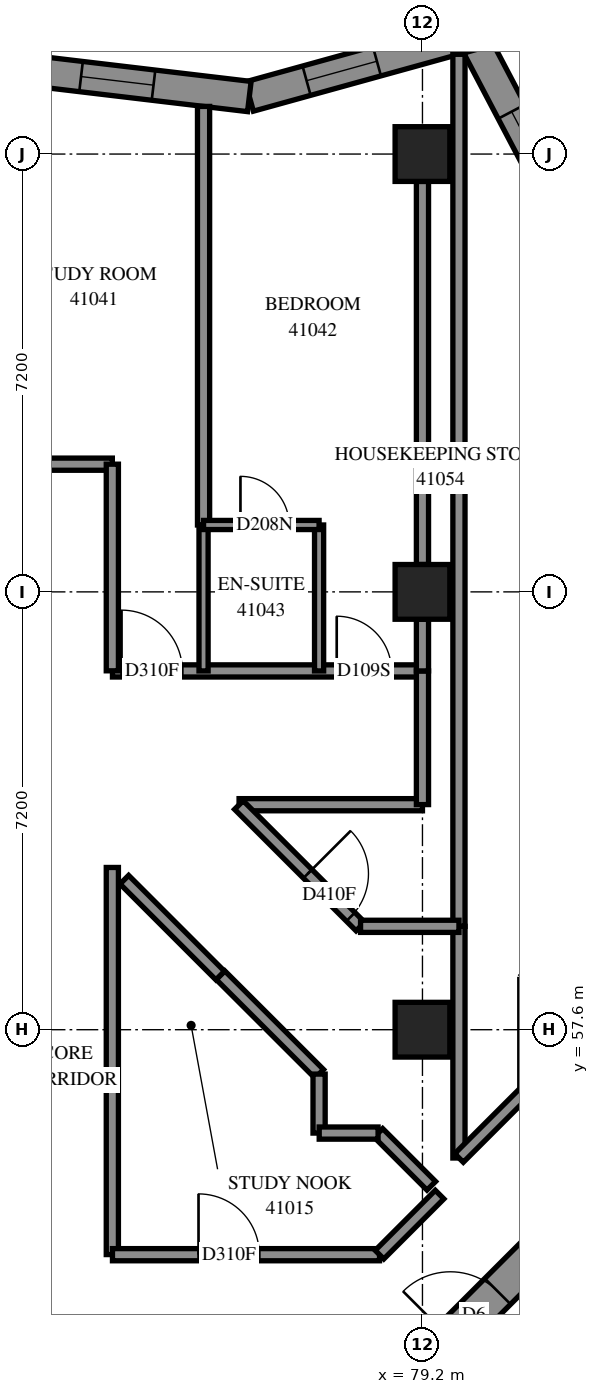
"""IFC4 building model, lengths in metres.
Left out: names, types, materials, properties, quantities, classifications, styles, units other than length and angle.
Written with IfcOpenShell. Run it as: python <this file> out.ifc"""

import sys

from ifc_helpers import new_model, si_unit, direction, frame, frame_2d, origin, origin_2d, place, context, subcontext, project, spatial, polyline, rectangle, outline, extrude, element, fill, save


model = new_model("IFC4")
c1 = context("Model", 3, precision=1e-05, world=origin(), true_north=direction((0.0, 1.0)))
c2 = subcontext(c1, "Body", "Model", "MODEL_VIEW")
j1 = project(units=[si_unit("LENGTHUNIT", "METRE"), si_unit("PLANEANGLEUNIT", "RADIAN")], contexts=[c1])
p1 = place(None, origin())
s1 = spatial("IfcSite", under=j1, at=p1, CompositionType="ELEMENT")
p2 = place(p1, origin())
s2 = spatial("IfcBuilding", under=s1, at=p2, CompositionType="ELEMENT")
p3 = place(p2, frame((0.0, 0.0, 152.4)))
s3 = spatial("IfcBuildingStorey", under=s2, at=p3, CompositionType="ELEMENT", Elevation=152.4)
for number, where, z_axis, x_axis in (
    (1, (79.2, 57.6, 0.0), (0.0, 0.0, 1.0), (1.0, 0.0, 0.0)),
    (2, (79.2, 64.8, 0.0), (0.0, 0.0, 1.0), (1.0, 0.0, 0.0)),
    (3, (79.2, 72.0, 0.0), (0.0, 0.0, 1.0), (1.0, 0.0, 0.0)),
):
    element("IfcColumn", number, at=place(p3, frame(where, z_axis=z_axis, x_axis=x_axis)), inside=s3, PredefinedType="COLUMN", context=c2, shape_type="SweptSolid", body=[
        extrude(rectangle(XDim=0.9, YDim=0.9, at=origin_2d()), origin(), (0.0, 0.0, 1.0), 3.1),
    ])
p4 = place(p3, frame((76.442, 49.302, -0.3), z_axis=(0.0, 0.0, 1.0), x_axis=(0.7071067812, 0.7071067812, 0.0)))
e4 = element("IfcWall", 4, at=p4, inside=s3, PredefinedType="SHEAR", context=c2, shape_type="SweptSolid", body=[
    extrude(rectangle(XDim=14.4, YDim=0.6, at=frame_2d((7.2, 0.0))), origin(), (0.0, 0.0, 1.0), 2.7),
])
p5 = place(p4, frame((4.55, 0.0, 0.3)))
e5 = element("IfcOpeningElement", 5, at=p5, cuts=e4, PredefinedType="OPENING", context=c2, shape_type="SweptSolid", body=[
    extrude(rectangle(XDim=1.1, YDim=2.1, at=frame_2d((0.55, 1.05))), frame((0.0, 0.31, 0.0), z_axis=(0.0, -1.0, 0.0), x_axis=(1.0, 0.0, 0.0)), (0.0, 0.0, 1.0), 0.62),
])
p6 = place(p4, frame((11.35, 0.0, 0.3)))
e6 = element("IfcOpeningElement", 6, at=p6, cuts=e4, PredefinedType="OPENING", context=c2, shape_type="SweptSolid", body=[
    extrude(rectangle(XDim=1.1, YDim=2.1, at=frame_2d((0.55, 1.05))), frame((0.0, 0.31, 0.0), z_axis=(0.0, -1.0, 0.0), x_axis=(1.0, 0.0, 0.0)), (0.0, 0.0, 1.0), 0.62),
])
p7 = place(p3, frame((81.582, 70.954, 0.0), z_axis=(0.0, 0.0, 1.0), x_axis=(-0.465076616, 0.8852704339, 0.0)))
e7 = element("IfcWall", 7, at=p7, inside=s3, PredefinedType="SOLIDWALL", context=c2, shape_type="SweptSolid", body=[
    extrude(outline(polyline([(0.055, -0.25), (3.593, -0.25), (3.189, 0.25), (-0.055, 0.25), (0.055, -0.25)])), origin(), (0.0, 0.0, 1.0), 3.1),
])
p8 = place(p7, frame((0.769, 0.0, 0.45)))
e8 = element("IfcOpeningElement", 8, at=p8, cuts=e7, PredefinedType="OPENING", context=c2, shape_type="SweptSolid", body=[
    extrude(rectangle(XDim=1.2, YDim=2.5, at=frame_2d((0.6, 1.25))), frame((0.0, 0.26, 0.0), z_axis=(0.0, -1.0, 0.0), x_axis=(1.0, 0.0, 0.0)), (0.0, 0.0, 1.0), 0.52),
])
p9 = place(p3, frame((80.005, 73.956, 0.0), z_axis=(0.0, 0.0, 1.0), x_axis=(-0.9638013092, -0.2666215226, 0.0)))
e9 = element("IfcWall", 9, at=p9, inside=s3, PredefinedType="SOLIDWALL", context=c2, shape_type="SweptSolid", body=[
    extrude(outline(polyline([(-0.202, -0.25), (3.74, -0.25), (3.838, 0.25), (0.202, 0.25), (-0.202, -0.25)])), origin(), (0.0, 0.0, 1.0), 3.1),
])
p10 = place(p9, frame((1.612, 0.0, 0.45)))
e10 = element("IfcOpeningElement", 10, at=p10, cuts=e9, PredefinedType="OPENING", context=c2, shape_type="SweptSolid", body=[
    extrude(rectangle(XDim=1.2, YDim=2.5, at=frame_2d((0.6, 1.25))), frame((0.0, 0.26, 0.0), z_axis=(0.0, -1.0, 0.0), x_axis=(1.0, 0.0, 0.0)), (0.0, 0.0, 1.0), 0.52),
])
p11 = place(p3, frame((76.353, 72.946, 0.0), z_axis=(0.0, 0.0, 1.0), x_axis=(-0.9930297168, 0.1178642505, 0.0)))
e11 = element("IfcWall", 11, at=p11, inside=s3, PredefinedType="SOLIDWALL", context=c2, shape_type="SweptSolid", body=[
    extrude(outline(polyline([(0.049, -0.25), (3.875, -0.25), (3.815, 0.25), (-0.049, 0.25), (0.049, -0.25)])), origin(), (0.0, 0.0, 1.0), 3.1),
])
p12 = place(p11, frame((1.587, 0.0, 0.45)))
e12 = element("IfcOpeningElement", 12, at=p12, cuts=e11, PredefinedType="OPENING", context=c2, shape_type="SweptSolid", body=[
    extrude(rectangle(XDim=1.2, YDim=2.5, at=frame_2d((0.6, 1.25))), frame((0.0, 0.26, 0.0), z_axis=(0.0, -1.0, 0.0), x_axis=(1.0, 0.0, 0.0)), (0.0, 0.0, 1.0), 0.52),
])
p13 = place(p3, frame((55.5, 66.9, 0.0), z_axis=(0.0, 0.0, 1.0), x_axis=(1.0, 0.0, 0.0)))
e13 = element("IfcWall", 13, at=p13, inside=s3, PredefinedType="PARTITIONING", context=c2, shape_type="SweptSolid", body=[
    extrude(rectangle(XDim=18.6, YDim=0.2, at=frame_2d((9.3, 0.0))), origin(), (0.0, 0.0, 1.0), 3.1),
])
p14 = place(p13, frame((4.4, 0.0, 0.0)))
e14 = element("IfcOpeningElement", 14, at=p14, cuts=e13, PredefinedType="OPENING", context=c2, shape_type="SweptSolid", body=[
    extrude(rectangle(XDim=0.9, YDim=2.1, at=frame_2d((0.45, 1.05))), frame((0.0, 0.11, 0.0), z_axis=(0.0, -1.0, 0.0), x_axis=(1.0, 0.0, 0.0)), (0.0, 0.0, 1.0), 0.22),
])
p15 = place(p13, frame((6.1, 0.0, 0.0)))
e15 = element("IfcOpeningElement", 15, at=p15, cuts=e13, PredefinedType="OPENING", context=c2, shape_type="SweptSolid", body=[
    extrude(rectangle(XDim=0.9, YDim=2.1, at=frame_2d((0.45, 1.05))), frame((0.0, 0.11, 0.0), z_axis=(0.0, -1.0, 0.0), x_axis=(1.0, 0.0, 0.0)), (0.0, 0.0, 1.0), 0.22),
])
p16 = place(p13, frame((11.65, 0.0, 0.0)))
e16 = element("IfcOpeningElement", 16, at=p16, cuts=e13, PredefinedType="OPENING", context=c2, shape_type="SweptSolid", body=[
    extrude(rectangle(XDim=0.9, YDim=2.1, at=frame_2d((0.45, 1.05))), frame((0.0, 0.11, 0.0), z_axis=(0.0, -1.0, 0.0), x_axis=(1.0, 0.0, 0.0)), (0.0, 0.0, 1.0), 0.22),
])
p17 = place(p13, frame((13.3, 0.0, 0.0)))
e17 = element("IfcOpeningElement", 17, at=p17, cuts=e13, PredefinedType="OPENING", context=c2, shape_type="SweptSolid", body=[
    extrude(rectangle(XDim=0.9, YDim=2.1, at=frame_2d((0.45, 1.05))), frame((0.0, 0.11, 0.0), z_axis=(0.0, -1.0, 0.0), x_axis=(1.0, 0.0, 0.0)), (0.0, 0.0, 1.0), 0.22),
])
p18 = place(p3, frame((79.8, 59.3, 0.0), z_axis=(0.0, 0.0, 1.0), x_axis=(0.0, 1.0, 0.0)))
e18 = element("IfcWall", 18, at=p18, inside=s3, PredefinedType="PARTITIONING", context=c2, shape_type="SweptSolid", body=[
    extrude(rectangle(XDim=14.34, YDim=0.2, at=frame_2d((7.17, 0.0))), origin(), (0.0, 0.0, 1.0), 3.1),
])
p19 = place(p3, frame((75.6, 65.9, 0.0), z_axis=(0.0, 0.0, 1.0), x_axis=(0.0, 1.0, 0.0)))
e19 = element("IfcWall", 19, at=p19, inside=s3, PredefinedType="PARTITIONING", context=c2, shape_type="SweptSolid", body=[
    extrude(rectangle(XDim=6.884, YDim=0.2, at=frame_2d((3.442, 0.0))), origin(), (0.0, 0.0, 1.0), 3.1),
])
p20 = place(p3, frame((74.1, 53.902, 0.0), z_axis=(0.0, 0.0, 1.0), x_axis=(0.0, 1.0, 0.0)))
e20 = element("IfcWall", 20, at=p20, inside=s3, PredefinedType="PARTITIONING", context=c2, shape_type="SweptSolid", body=[
    extrude(rectangle(XDim=6.366, YDim=0.2, at=frame_2d((3.183, 0.0))), origin(), (0.0, 0.0, 1.0), 3.1),
])
p21 = place(p3, frame((79.2, 65.25, 0.0), z_axis=(0.0, 0.0, 1.0), x_axis=(0.0, 1.0, 0.0)))
e21 = element("IfcWall", 21, at=p21, inside=s3, PredefinedType="PARTITIONING", context=c2, shape_type="SweptSolid", body=[
    extrude(rectangle(XDim=6.3, YDim=0.2, at=frame_2d((3.15, 0.0))), origin(), (0.0, 0.0, 1.0), 3.1),
])
p22 = place(p3, frame((74.102, 63.5, 0.0), z_axis=(0.0, 0.0, 1.0), x_axis=(1.0, 0.0, 0.0)))
e22 = element("IfcWall", 22, at=p22, inside=s3, PredefinedType="PARTITIONING", context=c2, shape_type="SweptSolid", body=[
    extrude(rectangle(XDim=5.098, YDim=0.2, at=frame_2d((2.549, 0.0))), origin(), (0.0, 0.0, 1.0), 3.1),
])
p23 = place(p22, frame((0.149, 0.0, 0.0)))
e23 = element("IfcOpeningElement", 23, at=p23, cuts=e22, PredefinedType="OPENING", context=c2, shape_type="SweptSolid", body=[
    extrude(rectangle(XDim=1.0, YDim=2.1, at=frame_2d((0.5, 1.05))), frame((0.0, 0.11, 0.0), z_axis=(0.0, -1.0, 0.0), x_axis=(1.0, 0.0, 0.0)), (0.0, 0.0, 1.0), 0.22),
])
p24 = place(p22, frame((3.688, 0.0, 0.0)))
e24 = element("IfcOpeningElement", 24, at=p24, cuts=e22, PredefinedType="OPENING", context=c2, shape_type="SweptSolid", body=[
    extrude(rectangle(XDim=0.9, YDim=2.1, at=frame_2d((0.45, 1.05))), frame((0.0, 0.11, 0.0), z_axis=(0.0, -1.0, 0.0), x_axis=(1.0, 0.0, 0.0)), (0.0, 0.0, 1.0), 0.22),
])
p25 = place(p3, frame((74.102, 53.9, 0.0), z_axis=(0.0, 0.0, 1.0), x_axis=(1.0, 0.0, 0.0)))
e25 = element("IfcWall", 25, at=p25, inside=s3, PredefinedType="PARTITIONING", context=c2, shape_type="SweptSolid", body=[
    extrude(rectangle(XDim=4.392, YDim=0.2, at=frame_2d((2.196, 0.0))), origin(), (0.0, 0.0, 1.0), 3.1),
])
p26 = place(p25, frame((1.415, 0.0, 0.0)))
e26 = element("IfcOpeningElement", 26, at=p26, cuts=e25, PredefinedType="OPENING", context=c2, shape_type="SweptSolid", body=[
    extrude(rectangle(XDim=1.0, YDim=2.1, at=frame_2d((0.5, 1.05))), frame((0.0, 0.11, 0.0), z_axis=(0.0, -1.0, 0.0), x_axis=(1.0, 0.0, 0.0)), (0.0, 0.0, 1.0), 0.22),
])
p27 = place(p3, frame((79.8, 55.49, 0.0), z_axis=(0.0, 0.0, 1.0), x_axis=(0.0, 1.0, 0.0)))
e27 = element("IfcWall", 27, at=p27, inside=s3, PredefinedType="PARTITIONING", context=c2, shape_type="SweptSolid", body=[
    extrude(rectangle(XDim=3.81, YDim=0.2, at=frame_2d((1.905, 0.0))), origin(), (0.0, 0.0, 1.0), 3.1),
])
p28 = place(p3, frame((74.1, 63.502, 0.0), z_axis=(0.0, 0.0, 1.0), x_axis=(0.0, 1.0, 0.0)))
e28 = element("IfcWall", 28, at=p28, inside=s3, PredefinedType="PARTITIONING", context=c2, shape_type="SweptSolid", body=[
    extrude(rectangle(XDim=3.398, YDim=0.2, at=frame_2d((1.699, 0.0))), origin(), (0.0, 0.0, 1.0), 3.1),
])
p29 = place(p3, frame((76.184, 61.3, 0.0), z_axis=(0.0, 0.0, 1.0), x_axis=(1.0, 0.0, 0.0)))
e29 = element("IfcWall", 29, at=p29, inside=s3, PredefinedType="PARTITIONING", context=c2, shape_type="SweptSolid", body=[
    extrude(rectangle(XDim=3.016, YDim=0.2, at=frame_2d((1.508, 0.0))), origin(), (0.0, 0.0, 1.0), 3.1),
])
p30 = place(p3, frame((76.181, 61.295, 0.0), z_axis=(0.0, 0.0, 1.0), x_axis=(0.7071067812, -0.7071067812, 0.0)))
e30 = element("IfcWall", 30, at=p30, inside=s3, PredefinedType="PARTITIONING", context=c2, shape_type="SweptSolid", body=[
    extrude(rectangle(XDim=2.826, YDim=0.2, at=frame_2d((1.413, 0.0))), origin(), (0.0, 0.0, 1.0), 3.1),
])
p31 = place(p30, frame((1.6, 0.0, 0.0)))
e31 = element("IfcOpeningElement", 31, at=p31, cuts=e30, PredefinedType="OPENING", context=c2, shape_type="SweptSolid", body=[
    extrude(rectangle(XDim=1.0, YDim=2.1, at=frame_2d((0.5, 1.05))), frame((0.0, 0.11, 0.0), z_axis=(0.0, -1.0, 0.0), x_axis=(1.0, 0.0, 0.0)), (0.0, 0.0, 1.0), 0.22),
])
for number, where, z_axis, x_axis in (
    (32, (75.6, 63.5, 0.0), (0.0, 0.0, 1.0), (0.0, 1.0, 0.0)),
    (33, (77.5, 63.5, 0.0), (0.0, 0.0, 1.0), (0.0, 1.0, 0.0)),
):
    element("IfcWall", number, at=place(p3, frame(where, z_axis=z_axis, x_axis=x_axis)), inside=s3, PredefinedType="PARTITIONING", context=c2, shape_type="SweptSolid", body=[
        extrude(rectangle(XDim=2.4, YDim=0.15, at=frame_2d((1.2, 0.0))), origin(), (0.0, 0.0, 1.0), 3.1),
    ])
p32 = place(p3, frame((75.879, 58.497, 0.0), z_axis=(0.0, 0.0, 1.0), x_axis=(0.7075423257, -0.7066709682, 0.0)))
e34 = element("IfcWall", 34, at=p32, inside=s3, PredefinedType="PARTITIONING", context=c2, shape_type="SweptSolid", body=[
    extrude(rectangle(XDim=2.295, YDim=0.2, at=frame_2d((1.148, 0.0))), origin(), (0.0, 0.0, 1.0), 3.1),
])
p33 = place(p3, frame((74.297, 60.067, 0.0), z_axis=(0.0, 0.0, 1.0), x_axis=(0.7071067812, -0.7071067812, 0.0)))
e35 = element("IfcWall", 35, at=p33, inside=s3, PredefinedType="PARTITIONING", context=c2, shape_type="SweptSolid", body=[
    extrude(rectangle(XDim=2.229, YDim=0.2, at=frame_2d((1.114, 0.0))), origin(), (0.0, 0.0, 1.0), 3.1),
])
p34 = place(p3, frame((79.2, 61.302, 0.0), z_axis=(0.0, 0.0, 1.0), x_axis=(0.0, 1.0, 0.0)))
e36 = element("IfcWall", 36, at=p34, inside=s3, PredefinedType="PARTITIONING", context=c2, shape_type="SweptSolid", body=[
    extrude(rectangle(XDim=2.198, YDim=0.2, at=frame_2d((1.099, 0.0))), origin(), (0.0, 0.0, 1.0), 3.1),
])
p35 = place(p3, frame((75.6, 65.9, 0.0), z_axis=(0.0, 0.0, 1.0), x_axis=(1.0, 0.0, 0.0)))
e37 = element("IfcWall", 37, at=p35, inside=s3, PredefinedType="PARTITIONING", context=c2, shape_type="SweptSolid", body=[
    extrude(rectangle(XDim=1.9, YDim=0.15, at=frame_2d((0.95, 0.0))), origin(), (0.0, 0.0, 1.0), 3.1),
])
p36 = place(p35, frame((0.607, 0.0, 0.0)))
e38 = element("IfcOpeningElement", 38, at=p36, cuts=e37, PredefinedType="OPENING", context=c2, shape_type="SweptSolid", body=[
    extrude(rectangle(XDim=0.8, YDim=2.1, at=frame_2d((0.4, 1.05))), frame((0.0, 0.085, 0.0), z_axis=(0.0, -1.0, 0.0), x_axis=(1.0, 0.0, 0.0)), (0.0, 0.0, 1.0), 0.17),
])
p37 = place(p3, frame((78.182, 59.3, 0.0), z_axis=(0.0, 0.0, 1.0), x_axis=(1.0, 0.0, 0.0)))
e39 = element("IfcWall", 39, at=p37, inside=s3, PredefinedType="PARTITIONING", context=c2, shape_type="SweptSolid", body=[
    extrude(rectangle(XDim=1.618, YDim=0.2, at=frame_2d((0.809, 0.0))), origin(), (0.0, 0.0, 1.0), 3.1),
])
p38 = place(p3, frame((79.801, 55.491, 0.0), z_axis=(0.0, 0.0, 1.0), x_axis=(0.7071067812, 0.7071067812, 0.0)))
e40 = element("IfcWall", 40, at=p38, inside=s3, PredefinedType="PARTITIONING", context=c2, shape_type="SweptSolid", body=[
    extrude(rectangle(XDim=1.553, YDim=0.2, at=frame_2d((0.776, 0.0))), origin(), (0.0, 0.0, 1.0), 3.1),
])
p39 = place(p3, frame((78.494, 53.9, 0.0), z_axis=(0.0, 0.0, 1.0), x_axis=(0.7071067812, 0.7071067812, 0.0)))
e41 = element("IfcWall", 41, at=p39, inside=s3, PredefinedType="PARTITIONING", context=c2, shape_type="SweptSolid", body=[
    extrude(rectangle(XDim=1.397, YDim=0.2, at=frame_2d((0.699, 0.0))), origin(), (0.0, 0.0, 1.0), 3.1),
])
p40 = place(p3, frame((78.475, 55.903, 0.0), z_axis=(0.0, 0.0, 1.0), x_axis=(0.7071067812, -0.7071067812, 0.0)))
e42 = element("IfcWall", 42, at=p40, inside=s3, PredefinedType="PARTITIONING", context=c2, shape_type="SweptSolid", body=[
    extrude(rectangle(XDim=1.23, YDim=0.2, at=frame_2d((0.615, 0.0))), origin(), (0.0, 0.0, 1.0), 3.1),
])
p41 = place(p3, frame((77.5, 55.9, 0.0), z_axis=(0.0, 0.0, 1.0), x_axis=(0.0, 1.0, 0.0)))
e43 = element("IfcWall", 43, at=p41, inside=s3, PredefinedType="PARTITIONING", context=c2, shape_type="SweptSolid", body=[
    extrude(rectangle(XDim=0.97, YDim=0.2, at=frame_2d((0.485, 0.0))), origin(), (0.0, 0.0, 1.0), 3.1),
])
p42 = place(p3, frame((77.502, 55.9, 0.0), z_axis=(0.0, 0.0, 1.0), x_axis=(1.0, 0.0, 0.0)))
e44 = element("IfcWall", 44, at=p42, inside=s3, PredefinedType="PARTITIONING", context=c2, shape_type="SweptSolid", body=[
    extrude(rectangle(XDim=0.968, YDim=0.2, at=frame_2d((0.484, 0.0))), origin(), (0.0, 0.0, 1.0), 3.1),
])
p43 = place(p3, frame((79.2, 63.5, 0.0), z_axis=(0.0, 0.0, 1.0), x_axis=(0.0, 1.0, 0.0)))
e45 = element("IfcWall", 45, at=p43, inside=s3, PredefinedType="PARTITIONING", context=c2, shape_type="SweptSolid", body=[
    extrude(rectangle(XDim=0.85, YDim=0.2, at=frame_2d((0.425, 0.0))), origin(), (0.0, 0.0, 1.0), 3.1),
])
p44 = place(p8, origin())
e46 = element("IfcWindow", 46, at=p44, inside=s3, PartitioningType="SINGLE_PANEL", PredefinedType="WINDOW", context=c2, shape_type="SweptSolid", body=[
    extrude(rectangle(XDim=1.2, YDim=2.5, at=frame_2d((0.6, 1.25))), frame((0.0, 0.18, 0.0), z_axis=(0.0, -1.0, 0.0), x_axis=(1.0, 0.0, 0.0)), (0.0, 0.0, 1.0), 0.06),
])
fill(e8, e46)
p45 = place(p10, origin())
e47 = element("IfcWindow", 47, at=p45, inside=s3, PartitioningType="SINGLE_PANEL", PredefinedType="WINDOW", context=c2, shape_type="SweptSolid", body=[
    extrude(rectangle(XDim=1.2, YDim=2.5, at=frame_2d((0.6, 1.25))), frame((0.0, 0.18, 0.0), z_axis=(0.0, -1.0, 0.0), x_axis=(1.0, 0.0, 0.0)), (0.0, 0.0, 1.0), 0.06),
])
fill(e10, e47)
p46 = place(p12, origin())
e48 = element("IfcWindow", 48, at=p46, inside=s3, PartitioningType="SINGLE_PANEL", PredefinedType="WINDOW", context=c2, shape_type="SweptSolid", body=[
    extrude(rectangle(XDim=1.2, YDim=2.5, at=frame_2d((0.6, 1.25))), frame((0.0, 0.18, 0.0), z_axis=(0.0, -1.0, 0.0), x_axis=(1.0, 0.0, 0.0)), (0.0, 0.0, 1.0), 0.06),
])
fill(e12, e48)
p47 = place(p5, origin())
e49 = element("IfcDoor", 49, at=p47, inside=s3, OperationType="DOUBLE_DOOR_SINGLE_SWING", PredefinedType="DOOR", context=c2, shape_type="SweptSolid", body=[
    extrude(rectangle(XDim=1.1, YDim=2.1, at=frame_2d((0.55, 1.05))), frame((0.0, 0.025, 0.0), z_axis=(0.0, -1.0, 0.0), x_axis=(1.0, 0.0, 0.0)), (0.0, 0.0, 1.0), 0.05),
])
fill(e5, e49)
p48 = place(p26, origin())
e50 = element("IfcDoor", 50, at=p48, inside=s3, OperationType="SINGLE_SWING_LEFT", PredefinedType="DOOR", context=c2, shape_type="SweptSolid", body=[
    extrude(rectangle(XDim=1.0, YDim=2.1, at=frame_2d((0.5, 1.05))), frame((0.0, 0.025, 0.0), z_axis=(0.0, -1.0, 0.0), x_axis=(1.0, 0.0, 0.0)), (0.0, 0.0, 1.0), 0.05),
])
fill(e26, e50)
p49 = place(p23, origin())
e51 = element("IfcDoor", 51, at=p49, inside=s3, OperationType="SINGLE_SWING_RIGHT", PredefinedType="DOOR", context=c2, shape_type="SweptSolid", body=[
    extrude(rectangle(XDim=1.0, YDim=2.1, at=frame_2d((0.5, 1.05))), frame((0.0, 0.025, 0.0), z_axis=(0.0, -1.0, 0.0), x_axis=(1.0, 0.0, 0.0)), (0.0, 0.0, 1.0), 0.05),
])
fill(e23, e51)
p50 = place(p24, origin())
e52 = element("IfcDoor", 52, at=p50, inside=s3, OperationType="SINGLE_SWING_LEFT", PredefinedType="DOOR", context=c2, shape_type="SweptSolid", body=[
    extrude(rectangle(XDim=0.9, YDim=2.1, at=frame_2d((0.45, 1.05))), frame((0.0, 0.025, 0.0), z_axis=(0.0, -1.0, 0.0), x_axis=(1.0, 0.0, 0.0)), (0.0, 0.0, 1.0), 0.05),
])
fill(e24, e52)
p51 = place(p36, origin())
e53 = element("IfcDoor", 53, at=p51, inside=s3, OperationType="SINGLE_SWING_RIGHT", PredefinedType="DOOR", context=c2, shape_type="SweptSolid", body=[
    extrude(rectangle(XDim=0.8, YDim=2.1, at=frame_2d((0.4, 1.05))), frame((0.0, 0.025, 0.0), z_axis=(0.0, -1.0, 0.0), x_axis=(1.0, 0.0, 0.0)), (0.0, 0.0, 1.0), 0.05),
])
fill(e38, e53)
p52 = place(p31, origin())
e54 = element("IfcDoor", 54, at=p52, inside=s3, OperationType="SINGLE_SWING_LEFT", PredefinedType="DOOR", context=c2, shape_type="SweptSolid", body=[
    extrude(rectangle(XDim=1.0, YDim=2.1, at=frame_2d((0.5, 1.05))), frame((0.0, 0.025, 0.0), z_axis=(0.0, -1.0, 0.0), x_axis=(1.0, 0.0, 0.0)), (0.0, 0.0, 1.0), 0.05),
])
fill(e31, e54)
save(model, sys.argv[1])
